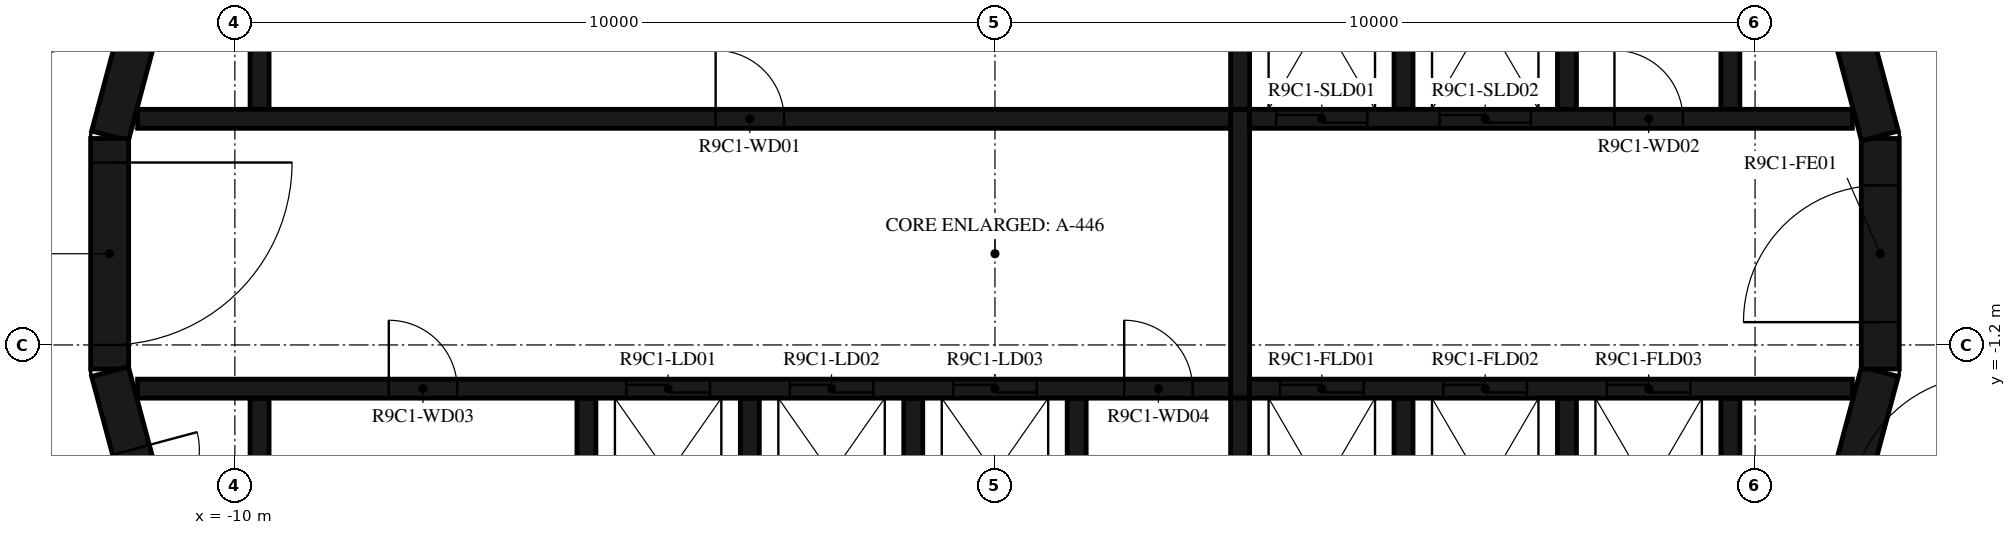
"""IFC4 building model, lengths in metres.
Left out: names, types, materials, properties, quantities, classifications, styles, units other than length and angle.
Written with IfcOpenShell. Run it as: python <this file> out.ifc"""

import sys

from ifc_helpers import new_model, si_unit, direction, frame, frame_2d, origin, place, context, subcontext, project, spatial, polyline, rectangle, outline, extrude, element, fill, save


model = new_model("IFC4")
c1 = context("Model", 3, precision=1e-05, world=origin(), true_north=direction((0.0, 1.0)))
c2 = subcontext(c1, "Body", "Model", "MODEL_VIEW")
j1 = project(units=[si_unit("LENGTHUNIT", "METRE"), si_unit("PLANEANGLEUNIT", "RADIAN")], contexts=[c1])
p1 = place(None, origin())
s1 = spatial("IfcSite", under=j1, at=p1, CompositionType="ELEMENT")
p2 = place(p1, origin())
s2 = spatial("IfcBuilding", under=s1, at=p2, CompositionType="ELEMENT")
p3 = place(p2, frame((0.0, 0.0, 357.5)))
s3 = spatial("IfcBuildingStorey", under=s2, at=p3, CompositionType="ELEMENT", Elevation=357.5)
p4 = place(p3, frame((10.858, -4.479, 0.0), z_axis=(0.0, 0.0, 1.0), x_axis=(0.258734743916, 0.965948410781, 0.0)))
e1 = element("IfcWall", 1, at=p4, inside=s3, PredefinedType="SHEAR", context=c2, shape_type="SweptSolid", body=[
    extrude(rectangle(XDim=3.033, YDim=0.5, at=frame_2d((1.516, 0.0))), origin(), (0.0, 0.0, 1.0), 3.12),
])
p5 = place(p3, frame((11.647, -1.516, 0.0), z_axis=(0.0, 0.0, 1.0), x_axis=(0.0, 1.0, 0.0)))
e2 = element("IfcWall", 2, at=p5, inside=s3, PredefinedType="SHEAR", context=c2, shape_type="SweptSolid", body=[
    extrude(rectangle(XDim=3.033, YDim=0.5, at=frame_2d((1.516, 0.0))), origin(), (0.0, 0.0, 1.0), 3.12),
])
p6 = place(p5, frame((0.616, 0.0, 0.0)))
e3 = element("IfcOpeningElement", 3, at=p6, cuts=e2, PredefinedType="OPENING", context=c2, shape_type="SweptSolid", body=[
    extrude(rectangle(XDim=1.8, YDim=2.1, at=frame_2d((0.9, 1.05))), frame((0.0, 0.26, 0.0), z_axis=(0.0, -1.0, 0.0), x_axis=(1.0, 0.0, 0.0)), (0.0, 0.0, 1.0), 0.52),
])
for number, where, z_axis, x_axis in (
    (4, (11.643, 1.55, 0.0), (0.0, 0.0, 1.0), (-0.259, 0.966, 0.0)),
    (5, (-10.858, 4.479, 0.0), (0.0, 0.0, 1.0), (-0.259, -0.966, 0.0)),
):
    element("IfcWall", number, at=place(p3, frame(where, z_axis=z_axis, x_axis=x_axis)), inside=s3, PredefinedType="SHEAR", context=c2, shape_type="SweptSolid", body=[
        extrude(rectangle(XDim=3.033, YDim=0.5, at=frame_2d((1.516, 0.0))), origin(), (0.0, 0.0, 1.0), 3.12),
    ])
p7 = place(p3, frame((-11.647, 1.516, 0.0), z_axis=(0.0, 0.0, 1.0), x_axis=(0.0, -1.0, 0.0)))
e6 = element("IfcWall", 6, at=p7, inside=s3, PredefinedType="SHEAR", context=c2, shape_type="SweptSolid", body=[
    extrude(rectangle(XDim=3.033, YDim=0.5, at=frame_2d((1.516, 0.0))), origin(), (0.0, 0.0, 1.0), 3.12),
])
p8 = place(p7, frame((0.316, 0.0, 0.0)))
e7 = element("IfcOpeningElement", 7, at=p8, cuts=e6, PredefinedType="OPENING", context=c2, shape_type="SweptSolid", body=[
    extrude(rectangle(XDim=2.4, YDim=2.1, at=frame_2d((1.2, 1.05))), frame((0.0, 0.26, 0.0), z_axis=(0.0, -1.0, 0.0), x_axis=(1.0, 0.0, 0.0)), (0.0, 0.0, 1.0), 0.52),
])
p9 = place(p3, frame((-11.643, -1.55, 0.0), z_axis=(0.0, 0.0, 1.0), x_axis=(0.258734743916, -0.965948410781, 0.0)))
e8 = element("IfcWall", 8, at=p9, inside=s3, PredefinedType="SHEAR", context=c2, shape_type="SweptSolid", body=[
    extrude(rectangle(XDim=3.033, YDim=0.5, at=frame_2d((1.516, 0.0))), origin(), (0.0, 0.0, 1.0), 3.12),
])
p10 = place(p9, frame((1.066, 0.0, 0.0)))
e9 = element("IfcOpeningElement", 9, at=p10, cuts=e8, PredefinedType="OPENING", context=c2, shape_type="SweptSolid", body=[
    extrude(rectangle(XDim=0.9, YDim=2.1, at=frame_2d((0.45, 1.05))), frame((0.0, 0.26, 0.0), z_axis=(0.0, -1.0, 0.0), x_axis=(1.0, 0.0, 0.0)), (0.0, 0.0, 1.0), 0.52),
])
p11 = place(p3, origin())
e10 = element("IfcWall", 10, at=p11, inside=s3, PredefinedType="SHEAR", context=c2, shape_type="SweptSolid", body=[
    extrude(outline(polyline([(-9.8, 1.9), (-9.55, 1.9), (-9.55, 4.8), (3.1, 4.8), (3.1, 1.9), (3.35, 1.9), (3.35, 4.8), (5.25, 4.8), (5.25, 1.9), (5.5, 1.9), (5.5, 4.8), (7.4, 4.8), (7.4, 1.9), (7.65, 1.9), (7.65, 4.8), (9.55, 4.8), (9.55, 1.9), (9.8, 1.9), (9.8, 4.8), (9.8, 5.05), (-9.8, 5.05), (-9.8, 4.8), (-9.8, 1.9)])), origin(), (0.0, 0.0, 1.0), 3.12),
])
p12 = place(p3, origin())
e11 = element("IfcWall", 11, at=p12, inside=s3, PredefinedType="SHEAR", context=c2, shape_type="SweptSolid", body=[
    extrude(outline(polyline([(9.8, -5.05), (9.8, -4.8), (9.8, -1.9), (9.55, -1.9), (9.55, -4.8), (7.65, -4.8), (7.65, -1.9), (7.4, -1.9), (7.4, -4.8), (5.5, -4.8), (5.5, -1.9), (5.25, -1.9), (5.25, -4.8), (3.35, -4.8), (3.35, -1.9), (3.1, -1.9), (3.1, -4.8), (1.2, -4.8), (1.2, -1.9), (0.95, -1.9), (0.95, -4.8), (-0.95, -4.8), (-0.95, -1.9), (-1.2, -1.9), (-1.2, -4.8), (-3.1, -4.8), (-3.1, -1.9), (-3.35, -1.9), (-3.35, -4.8), (-5.25, -4.8), (-5.25, -1.9), (-5.5, -1.9), (-5.5, -4.8), (-9.55, -4.8), (-9.55, -1.9), (-9.8, -1.9), (-9.8, -4.8), (-9.8, -5.05), (9.8, -5.05)])), origin(), (0.0, 0.0, 1.0), 3.12),
])
p13 = place(p3, frame((-11.28, 1.775, 0.0), z_axis=(0.0, 0.0, 1.0), x_axis=(1.0, 0.0, 0.0)))
e12 = element("IfcWall", 12, at=p13, inside=s3, PredefinedType="SHEAR", context=c2, shape_type="SweptSolid", body=[
    extrude(rectangle(XDim=14.38, YDim=0.25, at=frame_2d((7.19, 0.0))), origin(), (0.0, 0.0, 1.0), 3.12),
])
p14 = place(p13, frame((7.605, 0.0, 0.0)))
e13 = element("IfcOpeningElement", 13, at=p14, cuts=e12, PredefinedType="OPENING", context=c2, shape_type="SweptSolid", body=[
    extrude(rectangle(XDim=0.9, YDim=2.1, at=frame_2d((0.45, 1.05))), frame((0.0, 0.135, 0.0), z_axis=(0.0, -1.0, 0.0), x_axis=(1.0, 0.0, 0.0)), (0.0, 0.0, 1.0), 0.27),
])
p15 = place(p3, frame((3.35, 1.775, 0.0), z_axis=(0.0, 0.0, 1.0), x_axis=(1.0, 0.0, 0.0)))
e14 = element("IfcWall", 14, at=p15, inside=s3, PredefinedType="SHEAR", context=c2, shape_type="SweptSolid", body=[
    extrude(rectangle(XDim=7.93, YDim=0.25, at=frame_2d((3.965, 0.0))), origin(), (0.0, 0.0, 1.0), 3.12),
])
p16 = place(p15, frame((0.35, 0.0, 0.0)))
e15 = element("IfcOpeningElement", 15, at=p16, cuts=e14, PredefinedType="OPENING", context=c2, shape_type="SweptSolid", body=[
    extrude(rectangle(XDim=1.2, YDim=2.4, at=frame_2d((0.6, 1.2))), frame((0.0, 0.135, 0.0), z_axis=(0.0, -1.0, 0.0), x_axis=(1.0, 0.0, 0.0)), (0.0, 0.0, 1.0), 0.27),
])
p17 = place(p15, frame((2.5, 0.0, 0.0)))
e16 = element("IfcOpeningElement", 16, at=p17, cuts=e14, PredefinedType="OPENING", context=c2, shape_type="SweptSolid", body=[
    extrude(rectangle(XDim=1.2, YDim=2.4, at=frame_2d((0.6, 1.2))), frame((0.0, 0.135, 0.0), z_axis=(0.0, -1.0, 0.0), x_axis=(1.0, 0.0, 0.0)), (0.0, 0.0, 1.0), 0.27),
])
p18 = place(p15, frame((4.8, 0.0, 0.0)))
e17 = element("IfcOpeningElement", 17, at=p18, cuts=e14, PredefinedType="OPENING", context=c2, shape_type="SweptSolid", body=[
    extrude(rectangle(XDim=0.9, YDim=2.1, at=frame_2d((0.45, 1.05))), frame((0.0, 0.135, 0.0), z_axis=(0.0, -1.0, 0.0), x_axis=(1.0, 0.0, 0.0)), (0.0, 0.0, 1.0), 0.27),
])
p19 = place(p3, frame((-11.28, -1.775, 0.0), z_axis=(0.0, 0.0, 1.0), x_axis=(1.0, 0.0, 0.0)))
e18 = element("IfcWall", 18, at=p19, inside=s3, PredefinedType="SHEAR", context=c2, shape_type="SweptSolid", body=[
    extrude(rectangle(XDim=14.38, YDim=0.25, at=frame_2d((7.19, 0.0))), origin(), (0.0, 0.0, 1.0), 3.12),
])
p20 = place(p19, frame((6.43, 0.0, 0.0)))
e19 = element("IfcOpeningElement", 19, at=p20, cuts=e18, PredefinedType="OPENING", context=c2, shape_type="SweptSolid", body=[
    extrude(rectangle(XDim=1.1, YDim=2.1, at=frame_2d((0.55, 1.05))), frame((0.0, 0.135, 0.0), z_axis=(0.0, -1.0, 0.0), x_axis=(1.0, 0.0, 0.0)), (0.0, 0.0, 1.0), 0.27),
])
p21 = place(p19, frame((8.58, 0.0, 0.0)))
e20 = element("IfcOpeningElement", 20, at=p21, cuts=e18, PredefinedType="OPENING", context=c2, shape_type="SweptSolid", body=[
    extrude(rectangle(XDim=1.1, YDim=2.1, at=frame_2d((0.55, 1.05))), frame((0.0, 0.135, 0.0), z_axis=(0.0, -1.0, 0.0), x_axis=(1.0, 0.0, 0.0)), (0.0, 0.0, 1.0), 0.27),
])
p22 = place(p19, frame((10.73, 0.0, 0.0)))
e21 = element("IfcOpeningElement", 21, at=p22, cuts=e18, PredefinedType="OPENING", context=c2, shape_type="SweptSolid", body=[
    extrude(rectangle(XDim=1.1, YDim=2.1, at=frame_2d((0.55, 1.05))), frame((0.0, 0.135, 0.0), z_axis=(0.0, -1.0, 0.0), x_axis=(1.0, 0.0, 0.0)), (0.0, 0.0, 1.0), 0.27),
])
p23 = place(p19, frame((3.305, 0.0, 0.0)))
e22 = element("IfcOpeningElement", 22, at=p23, cuts=e18, PredefinedType="OPENING", context=c2, shape_type="SweptSolid", body=[
    extrude(rectangle(XDim=0.9, YDim=2.1, at=frame_2d((0.45, 1.05))), frame((0.0, 0.135, 0.0), z_axis=(0.0, -1.0, 0.0), x_axis=(1.0, 0.0, 0.0)), (0.0, 0.0, 1.0), 0.27),
])
p24 = place(p19, frame((12.98, 0.0, 0.0)))
e23 = element("IfcOpeningElement", 23, at=p24, cuts=e18, PredefinedType="OPENING", context=c2, shape_type="SweptSolid", body=[
    extrude(rectangle(XDim=0.9, YDim=2.1, at=frame_2d((0.45, 1.05))), frame((0.0, 0.135, 0.0), z_axis=(0.0, -1.0, 0.0), x_axis=(1.0, 0.0, 0.0)), (0.0, 0.0, 1.0), 0.27),
])
p25 = place(p3, frame((3.35, -1.775, 0.0), z_axis=(0.0, 0.0, 1.0), x_axis=(1.0, 0.0, 0.0)))
e24 = element("IfcWall", 24, at=p25, inside=s3, PredefinedType="SHEAR", context=c2, shape_type="SweptSolid", body=[
    extrude(rectangle(XDim=7.93, YDim=0.25, at=frame_2d((3.965, 0.0))), origin(), (0.0, 0.0, 1.0), 3.12),
])
p26 = place(p25, frame((0.4, 0.0, 0.0)))
e25 = element("IfcOpeningElement", 25, at=p26, cuts=e24, PredefinedType="OPENING", context=c2, shape_type="SweptSolid", body=[
    extrude(rectangle(XDim=1.1, YDim=2.4, at=frame_2d((0.55, 1.2))), frame((0.0, 0.135, 0.0), z_axis=(0.0, -1.0, 0.0), x_axis=(1.0, 0.0, 0.0)), (0.0, 0.0, 1.0), 0.27),
])
p27 = place(p25, frame((2.55, 0.0, 0.0)))
e26 = element("IfcOpeningElement", 26, at=p27, cuts=e24, PredefinedType="OPENING", context=c2, shape_type="SweptSolid", body=[
    extrude(rectangle(XDim=1.1, YDim=2.4, at=frame_2d((0.55, 1.2))), frame((0.0, 0.135, 0.0), z_axis=(0.0, -1.0, 0.0), x_axis=(1.0, 0.0, 0.0)), (0.0, 0.0, 1.0), 0.27),
])
p28 = place(p25, frame((4.7, 0.0, 0.0)))
e27 = element("IfcOpeningElement", 27, at=p28, cuts=e24, PredefinedType="OPENING", context=c2, shape_type="SweptSolid", body=[
    extrude(rectangle(XDim=1.1, YDim=2.4, at=frame_2d((0.55, 1.2))), frame((0.0, 0.135, 0.0), z_axis=(0.0, -1.0, 0.0), x_axis=(1.0, 0.0, 0.0)), (0.0, 0.0, 1.0), 0.27),
])
p29 = place(p3, frame((3.225, -1.9, 0.0), z_axis=(0.0, 0.0, 1.0), x_axis=(0.0, 1.0, 0.0)))
e28 = element("IfcWall", 28, at=p29, inside=s3, PredefinedType="SHEAR", context=c2, shape_type="SweptSolid", body=[
    extrude(rectangle(XDim=3.8, YDim=0.25, at=frame_2d((1.9, 0.0))), origin(), (0.0, 0.0, 1.0), 3.12),
])
p30 = place(p3, frame((13.769, 1.691, 0.0), z_axis=(0.0, 0.0, 1.0), x_axis=(-0.374618189599, 0.92717916932, 0.0)))
e29 = element("IfcWall", 29, at=p30, inside=s3, PredefinedType="STANDARD", context=c2, shape_type="SweptSolid", body=[
    extrude(rectangle(XDim=7.181, YDim=0.2, at=frame_2d((3.591, 0.0))), origin(), (0.0, 0.0, 1.0), 3.12),
])
p31 = place(p30, frame((2.41, 0.0, 0.0)))
e30 = element("IfcOpeningElement", 30, at=p31, cuts=e29, PredefinedType="OPENING", context=c2, shape_type="SweptSolid", body=[
    extrude(rectangle(XDim=1.0, YDim=2.1, at=frame_2d((0.5, 1.05))), frame((0.0, 0.11, 0.0), z_axis=(0.0, -1.0, 0.0), x_axis=(1.0, 0.0, 0.0)), (0.0, 0.0, 1.0), 0.22),
])
p32 = place(p3, frame((-13.769, -1.691, 0.0), z_axis=(0.0, 0.0, 1.0), x_axis=(0.372720094028, -0.927943819155, 0.0)))
e31 = element("IfcWall", 31, at=p32, inside=s3, PredefinedType="STANDARD", context=c2, shape_type="SweptSolid", body=[
    extrude(rectangle(XDim=4.875, YDim=0.2, at=frame_2d((2.438, 0.0))), origin(), (0.0, 0.0, 1.0), 3.12),
])
p33 = place(p8, origin())
e32 = element("IfcDoor", 32, at=p33, inside=s3, OperationType="DOUBLE_DOOR_SINGLE_SWING", PredefinedType="DOOR", context=c2, shape_type="SweptSolid", body=[
    extrude(rectangle(XDim=2.4, YDim=2.1, at=frame_2d((1.2, 1.05))), frame((0.0, 0.025, 0.0), z_axis=(0.0, -1.0, 0.0), x_axis=(1.0, 0.0, 0.0)), (0.0, 0.0, 1.0), 0.05),
])
fill(e7, e32)
p34 = place(p6, origin())
e33 = element("IfcDoor", 33, at=p34, inside=s3, OperationType="DOUBLE_DOOR_SINGLE_SWING", PredefinedType="DOOR", context=c2, shape_type="SweptSolid", body=[
    extrude(rectangle(XDim=1.8, YDim=2.1, at=frame_2d((0.9, 1.05))), frame((0.0, 0.025, 0.0), z_axis=(0.0, -1.0, 0.0), x_axis=(1.0, 0.0, 0.0)), (0.0, 0.0, 1.0), 0.05),
])
fill(e3, e33)
p35 = place(p16, origin())
e34 = element("IfcDoor", 34, at=p35, inside=s3, OperationType="DOUBLE_DOOR_SLIDING", PredefinedType="DOOR", context=c2, shape_type="SweptSolid", body=[
    extrude(rectangle(XDim=1.2, YDim=2.4, at=frame_2d((0.6, 1.2))), frame((0.0, 0.025, 0.0), z_axis=(0.0, -1.0, 0.0), x_axis=(1.0, 0.0, 0.0)), (0.0, 0.0, 1.0), 0.05),
])
fill(e15, e34)
p36 = place(p17, origin())
e35 = element("IfcDoor", 35, at=p36, inside=s3, OperationType="DOUBLE_DOOR_SLIDING", PredefinedType="DOOR", context=c2, shape_type="SweptSolid", body=[
    extrude(rectangle(XDim=1.2, YDim=2.4, at=frame_2d((0.6, 1.2))), frame((0.0, 0.025, 0.0), z_axis=(0.0, -1.0, 0.0), x_axis=(1.0, 0.0, 0.0)), (0.0, 0.0, 1.0), 0.05),
])
fill(e16, e35)
p37 = place(p20, origin())
e36 = element("IfcDoor", 36, at=p37, inside=s3, OperationType="DOUBLE_DOOR_SLIDING", PredefinedType="DOOR", context=c2, shape_type="SweptSolid", body=[
    extrude(rectangle(XDim=1.1, YDim=2.1, at=frame_2d((0.55, 1.05))), frame((0.0, 0.025, 0.0), z_axis=(0.0, -1.0, 0.0), x_axis=(1.0, 0.0, 0.0)), (0.0, 0.0, 1.0), 0.05),
])
fill(e19, e36)
p38 = place(p21, origin())
e37 = element("IfcDoor", 37, at=p38, inside=s3, OperationType="DOUBLE_DOOR_SLIDING", PredefinedType="DOOR", context=c2, shape_type="SweptSolid", body=[
    extrude(rectangle(XDim=1.1, YDim=2.1, at=frame_2d((0.55, 1.05))), frame((0.0, 0.025, 0.0), z_axis=(0.0, -1.0, 0.0), x_axis=(1.0, 0.0, 0.0)), (0.0, 0.0, 1.0), 0.05),
])
fill(e20, e37)
p39 = place(p22, origin())
e38 = element("IfcDoor", 38, at=p39, inside=s3, OperationType="DOUBLE_DOOR_SLIDING", PredefinedType="DOOR", context=c2, shape_type="SweptSolid", body=[
    extrude(rectangle(XDim=1.1, YDim=2.1, at=frame_2d((0.55, 1.05))), frame((0.0, 0.025, 0.0), z_axis=(0.0, -1.0, 0.0), x_axis=(1.0, 0.0, 0.0)), (0.0, 0.0, 1.0), 0.05),
])
fill(e21, e38)
p40 = place(p26, origin())
e39 = element("IfcDoor", 39, at=p40, inside=s3, OperationType="DOUBLE_DOOR_SLIDING", PredefinedType="DOOR", context=c2, shape_type="SweptSolid", body=[
    extrude(rectangle(XDim=1.1, YDim=2.4, at=frame_2d((0.55, 1.2))), frame((0.0, 0.025, 0.0), z_axis=(0.0, -1.0, 0.0), x_axis=(1.0, 0.0, 0.0)), (0.0, 0.0, 1.0), 0.05),
])
fill(e25, e39)
p41 = place(p27, origin())
e40 = element("IfcDoor", 40, at=p41, inside=s3, OperationType="DOUBLE_DOOR_SLIDING", PredefinedType="DOOR", context=c2, shape_type="SweptSolid", body=[
    extrude(rectangle(XDim=1.1, YDim=2.4, at=frame_2d((0.55, 1.2))), frame((0.0, 0.025, 0.0), z_axis=(0.0, -1.0, 0.0), x_axis=(1.0, 0.0, 0.0)), (0.0, 0.0, 1.0), 0.05),
])
fill(e26, e40)
p42 = place(p28, origin())
e41 = element("IfcDoor", 41, at=p42, inside=s3, OperationType="DOUBLE_DOOR_SLIDING", PredefinedType="DOOR", context=c2, shape_type="SweptSolid", body=[
    extrude(rectangle(XDim=1.1, YDim=2.4, at=frame_2d((0.55, 1.2))), frame((0.0, 0.025, 0.0), z_axis=(0.0, -1.0, 0.0), x_axis=(1.0, 0.0, 0.0)), (0.0, 0.0, 1.0), 0.05),
])
fill(e27, e41)
p43 = place(p14, origin())
e42 = element("IfcDoor", 42, at=p43, inside=s3, OperationType="SINGLE_SWING_LEFT", PredefinedType="DOOR", context=c2, shape_type="SweptSolid", body=[
    extrude(rectangle(XDim=0.9, YDim=2.1, at=frame_2d((0.45, 1.05))), frame((0.0, 0.025, 0.0), z_axis=(0.0, -1.0, 0.0), x_axis=(1.0, 0.0, 0.0)), (0.0, 0.0, 1.0), 0.05),
])
fill(e13, e42)
p44 = place(p18, origin())
e43 = element("IfcDoor", 43, at=p44, inside=s3, OperationType="SINGLE_SWING_RIGHT", PredefinedType="DOOR", context=c2, shape_type="SweptSolid", body=[
    extrude(rectangle(XDim=0.9, YDim=2.1, at=frame_2d((0.45, 1.05))), frame((0.0, 0.025, 0.0), z_axis=(0.0, -1.0, 0.0), x_axis=(1.0, 0.0, 0.0)), (0.0, 0.0, 1.0), 0.05),
])
fill(e17, e43)
p45 = place(p23, origin())
e44 = element("IfcDoor", 44, at=p45, inside=s3, OperationType="SINGLE_SWING_LEFT", PredefinedType="DOOR", context=c2, shape_type="SweptSolid", body=[
    extrude(rectangle(XDim=0.9, YDim=2.1, at=frame_2d((0.45, 1.05))), frame((0.0, 0.025, 0.0), z_axis=(0.0, -1.0, 0.0), x_axis=(1.0, 0.0, 0.0)), (0.0, 0.0, 1.0), 0.05),
])
fill(e22, e44)
p46 = place(p24, origin())
e45 = element("IfcDoor", 45, at=p46, inside=s3, OperationType="SINGLE_SWING_RIGHT", PredefinedType="DOOR", context=c2, shape_type="SweptSolid", body=[
    extrude(rectangle(XDim=0.9, YDim=2.1, at=frame_2d((0.45, 1.05))), frame((0.0, 0.025, 0.0), z_axis=(0.0, -1.0, 0.0), x_axis=(1.0, 0.0, 0.0)), (0.0, 0.0, 1.0), 0.05),
])
fill(e23, e45)
p47 = place(p10, origin())
e46 = element("IfcDoor", 46, at=p47, inside=s3, OperationType="SINGLE_SWING_LEFT", PredefinedType="DOOR", context=c2, shape_type="SweptSolid", body=[
    extrude(rectangle(XDim=0.9, YDim=2.1, at=frame_2d((0.45, 1.05))), frame((0.0, 0.025, 0.0), z_axis=(0.0, -1.0, 0.0), x_axis=(1.0, 0.0, 0.0)), (0.0, 0.0, 1.0), 0.05),
])
fill(e9, e46)
save(model, sys.argv[1])
